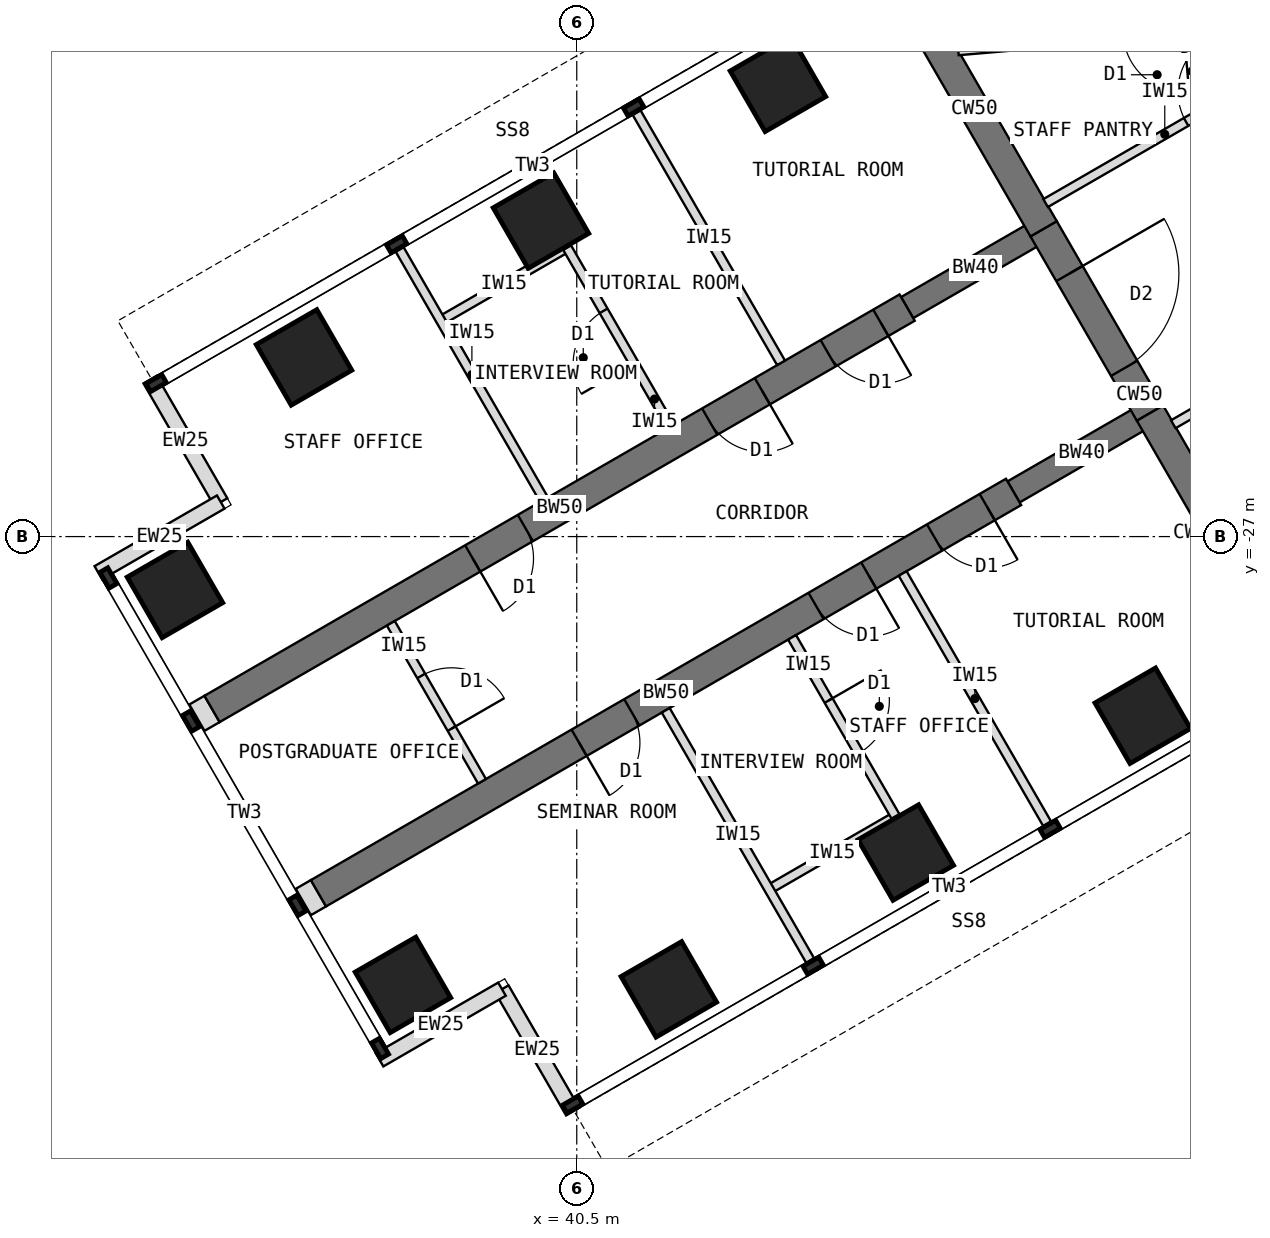
"""IFC4 building model, lengths in metres.
Left out: names, types, materials, properties, quantities, classifications, styles, units other than length and angle.
Written with IfcOpenShell. Run it as: python <this file> out.ifc"""

import sys

from ifc_helpers import new_model, si_unit, direction, frame, frame_2d, origin, origin_2d, place, context, subcontext, project, spatial, rectangle, extrude, element, fill, save


model = new_model("IFC4")
c1 = context("Model", 3, precision=1e-05, world=origin(), true_north=direction((0.0, 1.0)))
c2 = subcontext(c1, "Body", "Model", "MODEL_VIEW")
j1 = project(units=[si_unit("LENGTHUNIT", "METRE"), si_unit("PLANEANGLEUNIT", "RADIAN")], contexts=[c1])
p1 = place(None, origin())
s1 = spatial("IfcSite", under=j1, at=p1, CompositionType="ELEMENT")
p2 = place(p1, origin())
s2 = spatial("IfcBuilding", under=s1, at=p2, CompositionType="ELEMENT")
p3 = place(p2, frame((0.0, 0.0, 206.5)))
s3 = spatial("IfcBuildingStorey", under=s2, at=p3, CompositionType="ELEMENT", Elevation=206.5)
p4 = place(p3, frame((45.904, -18.0, 0.0), z_axis=(0.0, 0.0, 1.0), x_axis=(0.500024481964, -0.866011268655, 0.0)))
e1 = element("IfcWall", 1, at=p4, inside=s3, PredefinedType="SHEAR", context=c2, shape_type="SweptSolid", body=[
    extrude(rectangle(XDim=4.548, YDim=0.5, at=frame_2d((2.274, 0.0))), origin(), (0.0, 0.0, 1.0), 4.0),
])
p5 = place(p3, frame((48.178, -21.939, 0.0), z_axis=(0.0, 0.0, 1.0), x_axis=(0.500010275428, -0.866019471182, 0.0)))
e2 = element("IfcWall", 2, at=p5, inside=s3, PredefinedType="SHEAR", context=c2, shape_type="SweptSolid", body=[
    extrude(rectangle(XDim=3.5, YDim=0.5, at=frame_2d((1.75, 0.0))), origin(), (0.0, 0.0, 1.0), 4.0),
])
p6 = place(p5, frame((0.85, 0.0, 0.0)))
e3 = element("IfcOpeningElement", 3, at=p6, cuts=e2, PredefinedType="OPENING", context=c2, shape_type="SweptSolid", body=[
    extrude(rectangle(XDim=1.8, YDim=2.1, at=frame_2d((0.9, 1.05))), frame((0.0, 0.26, 0.0), z_axis=(0.0, -1.0, 0.0), x_axis=(1.0, 0.0, 0.0)), (0.0, 0.0, 1.0), 0.52),
])
p7 = place(p3, frame((49.928, -24.97, 0.0), z_axis=(0.0, 0.0, 1.0), x_axis=(0.499984222037, -0.866034513004, 0.0)))
e4 = element("IfcWall", 4, at=p7, inside=s3, PredefinedType="SHEAR", context=c2, shape_type="SweptSolid", body=[
    extrude(rectangle(XDim=4.548, YDim=0.5, at=frame_2d((2.274, 0.0))), origin(), (0.0, 0.0, 1.0), 4.0),
])
p8 = place(p3, frame((49.928, -24.97, 0.0), z_axis=(0.0, 0.0, 1.0), x_axis=(-0.866031863473, -0.499988811324, 0.0)))
e5 = element("IfcWall", 5, at=p8, inside=s3, PredefinedType="SHEAR", context=c2, shape_type="SweptSolid", body=[
    extrude(rectangle(XDim=2.592, YDim=0.4, at=frame_2d((1.296, 0.0))), origin(), (0.0, 0.0, 1.0), 4.0),
])
p9 = place(p3, frame((47.684, -26.266, 0.0), z_axis=(0.0, 0.0, 1.0), x_axis=(-0.866027579429, -0.499996231654, 0.0)))
e6 = element("IfcWall", 6, at=p9, inside=s3, PredefinedType="SHEAR", context=c2, shape_type="SweptSolid", body=[
    extrude(rectangle(XDim=13.2, YDim=0.5, at=frame_2d((6.6, 0.0))), origin(), (0.0, 0.0, 1.0), 4.0),
])
p10 = place(p9, frame((0.5, 0.0, 0.0)))
e7 = element("IfcOpeningElement", 7, at=p10, cuts=e6, PredefinedType="OPENING", context=c2, shape_type="SweptSolid", body=[
    extrude(rectangle(XDim=1.0, YDim=2.1, at=frame_2d((0.5, 1.05))), frame((0.0, 0.26, 0.0), z_axis=(0.0, -1.0, 0.0), x_axis=(1.0, 0.0, 0.0)), (0.0, 0.0, 1.0), 0.52),
])
p11 = place(p9, frame((2.75, 0.0, 0.0)))
e8 = element("IfcOpeningElement", 8, at=p11, cuts=e6, PredefinedType="OPENING", context=c2, shape_type="SweptSolid", body=[
    extrude(rectangle(XDim=1.0, YDim=2.1, at=frame_2d((0.5, 1.05))), frame((0.0, 0.26, 0.0), z_axis=(0.0, -1.0, 0.0), x_axis=(1.0, 0.0, 0.0)), (0.0, 0.0, 1.0), 0.52),
])
p12 = place(p9, frame((7.25, 0.0, 0.0)))
e9 = element("IfcOpeningElement", 9, at=p12, cuts=e6, PredefinedType="OPENING", context=c2, shape_type="SweptSolid", body=[
    extrude(rectangle(XDim=1.0, YDim=2.1, at=frame_2d((0.5, 1.05))), frame((0.0, 0.26, 0.0), z_axis=(0.0, -1.0, 0.0), x_axis=(1.0, 0.0, 0.0)), (0.0, 0.0, 1.0), 0.52),
])
p13 = place(p3, frame((48.178, -21.939, 0.0), z_axis=(0.0, 0.0, 1.0), x_axis=(-0.866072649678, -0.499918158782, 0.0)))
e10 = element("IfcWall", 10, at=p13, inside=s3, PredefinedType="SHEAR", context=c2, shape_type="SweptSolid", body=[
    extrude(rectangle(XDim=2.592, YDim=0.4, at=frame_2d((1.296, 0.0))), origin(), (0.0, 0.0, 1.0), 4.0),
])
p14 = place(p3, frame((45.934, -23.234, 0.0), z_axis=(0.0, 0.0, 1.0), x_axis=(-0.866019570528, -0.500010103361, 0.0)))
e11 = element("IfcWall", 11, at=p14, inside=s3, PredefinedType="SHEAR", context=c2, shape_type="SweptSolid", body=[
    extrude(rectangle(XDim=13.2, YDim=0.5, at=frame_2d((6.6, 0.0))), origin(), (0.0, 0.0, 1.0), 4.0),
])
p15 = place(p14, frame((0.5, 0.0, 0.0)))
e12 = element("IfcOpeningElement", 12, at=p15, cuts=e11, PredefinedType="OPENING", context=c2, shape_type="SweptSolid", body=[
    extrude(rectangle(XDim=1.0, YDim=2.1, at=frame_2d((0.5, 1.05))), frame((0.0, 0.26, 0.0), z_axis=(0.0, -1.0, 0.0), x_axis=(1.0, 0.0, 0.0)), (0.0, 0.0, 1.0), 0.52),
])
p16 = place(p14, frame((2.75, 0.0, 0.0)))
e13 = element("IfcOpeningElement", 13, at=p16, cuts=e11, PredefinedType="OPENING", context=c2, shape_type="SweptSolid", body=[
    extrude(rectangle(XDim=1.0, YDim=2.1, at=frame_2d((0.5, 1.05))), frame((0.0, 0.26, 0.0), z_axis=(0.0, -1.0, 0.0), x_axis=(1.0, 0.0, 0.0)), (0.0, 0.0, 1.0), 0.52),
])
p17 = place(p14, frame((7.25, 0.0, 0.0)))
e14 = element("IfcOpeningElement", 14, at=p17, cuts=e11, PredefinedType="OPENING", context=c2, shape_type="SweptSolid", body=[
    extrude(rectangle(XDim=1.0, YDim=2.1, at=frame_2d((0.5, 1.05))), frame((0.0, 0.26, 0.0), z_axis=(0.0, -1.0, 0.0), x_axis=(1.0, 0.0, 0.0)), (0.0, 0.0, 1.0), 0.52),
])
for number, where, z_axis, x_axis in (
    (15, (49.809, -29.946, 0.0), (0.0, 0.0, 1.0), (0.866, 0.5, 0.0)),
    (16, (43.809, -19.554, 0.0), (0.0, 0.0, 1.0), (0.866, 0.5, 0.0)),
    (17, (45.912, -32.196, 0.0), (0.0, 0.0, 1.0), (0.866, 0.5, 0.0)),
    (18, (39.912, -21.804, 0.0), (0.0, 0.0, 1.0), (0.866, 0.5, 0.0)),
    (19, (42.014, -34.446, 0.0), (0.0, 0.0, 1.0), (0.866, 0.5, 0.0)),
    (20, (36.014, -24.054, 0.0), (0.0, 0.0, 1.0), (0.866, 0.5, 0.0)),
    (21, (37.642, -34.373, 0.0), (0.0, 0.0, 1.0), (0.866, 0.5, 0.0)),
    (22, (33.892, -27.877, 0.0), (0.0, 0.0, 1.0), (0.866, 0.5, 0.0)),
):
    element("IfcColumn", number, at=place(p3, frame(where, z_axis=z_axis, x_axis=x_axis)), inside=s3, PredefinedType="COLUMN", context=c2, shape_type="SweptSolid", body=[
        extrude(rectangle(XDim=1.15, YDim=1.15, at=origin_2d()), origin(), (0.0, 0.0, 1.0), 4.0),
    ])
for number, where, z_axis, x_axis in (
    (23, (40.433, -36.456, 0.0), (0.0, 0.0, 1.0), (-0.5, 0.866, 0.0)),
    (24, (39.27, -34.443, 0.0), (0.0, 0.0, 1.0), (-0.866, -0.5, 0.0)),
    (25, (33.483, -24.419, 0.0), (0.0, 0.0, 1.0), (0.5, -0.866, 0.0)),
    (26, (34.645, -26.432, 0.0), (0.0, 0.0, 1.0), (-0.866, -0.5, 0.0)),
):
    element("IfcWall", number, at=place(p3, frame(where, z_axis=z_axis, x_axis=x_axis)), inside=s3, PredefinedType="STANDARD", context=c2, shape_type="SweptSolid", body=[
        extrude(rectangle(XDim=2.325, YDim=0.25, at=frame_2d((1.163, 0.0))), origin(), (0.0, 0.0, 1.0), 3.8),
    ])
for number, where, z_axis, x_axis in (
    (27, (36.252, -32.865, 0.0), (0.0, 0.0, 1.0), (-0.866, -0.5, 0.0)),
    (28, (34.502, -29.834, 0.0), (0.0, 0.0, 1.0), (-0.866, -0.5, 0.0)),
):
    element("IfcWall", number, at=place(p3, frame(where, z_axis=z_axis, x_axis=x_axis)), inside=s3, PredefinedType="PARTITIONING", context=c2, shape_type="SweptSolid", body=[
        extrude(rectangle(XDim=0.288, YDim=0.5, at=frame_2d((0.144, 0.0))), origin(), (0.0, 0.0, 1.0), 3.8),
    ])
p18 = place(p3, frame((52.38, -19.201, 0.0), z_axis=(0.0, 0.0, 1.0), x_axis=(-0.866012946976, 0.500021575205, 0.0)))
e29 = element("IfcWall", 29, at=p18, inside=s3, PredefinedType="SHEAR", context=c2, shape_type="SweptSolid", body=[
    extrude(rectangle(XDim=5.958, YDim=0.4, at=frame_2d((2.979, 0.0))), origin(), (0.0, 0.0, 1.0), 4.0),
])
for number, where, z_axis, x_axis in (
    (30, (45.86, -27.607, 0.0), (0.0, 0.0, 1.0), (0.5, -0.866, 0.0)),
    (31, (41.963, -29.857, 0.0), (0.0, 0.0, 1.0), (0.5, -0.866, 0.0)),
):
    element("IfcWall", number, at=place(p3, frame(where, z_axis=z_axis, x_axis=x_axis)), inside=s3, PredefinedType="PARTITIONING", context=c2, shape_type="SweptSolid", body=[
        extrude(rectangle(XDim=4.75, YDim=0.15, at=frame_2d((2.375, 0.0))), origin(), (0.0, 0.0, 1.0), 3.8),
    ])
p19 = place(p3, frame((45.741, -31.602, 0.0), z_axis=(0.0, 0.0, 1.0), x_axis=(-0.866024647952, -0.500001309137, 0.0)))
e32 = element("IfcWall", 32, at=p19, inside=s3, PredefinedType="PARTITIONING", context=c2, shape_type="SweptSolid", body=[
    extrude(rectangle(XDim=2.4, YDim=0.15, at=frame_2d((1.2, 0.0))), origin(), (0.0, 0.0, 1.0), 3.8),
])
p20 = place(p3, frame((44.042, -28.657, 0.0), z_axis=(0.0, 0.0, 1.0), x_axis=(0.499977295307, -0.866038511948, 0.0)))
e33 = element("IfcWall", 33, at=p20, inside=s3, PredefinedType="PARTITIONING", context=c2, shape_type="SweptSolid", body=[
    extrude(rectangle(XDim=3.4, YDim=0.15, at=frame_2d((1.7, 0.0))), origin(), (0.0, 0.0, 1.0), 3.8),
])
p21 = place(p20, frame((1.2, 0.0, 0.0)))
e34 = element("IfcOpeningElement", 34, at=p21, cuts=e33, PredefinedType="OPENING", context=c2, shape_type="SweptSolid", body=[
    extrude(rectangle(XDim=1.0, YDim=2.1, at=frame_2d((0.5, 1.05))), frame((0.0, 0.085, 0.0), z_axis=(0.0, -1.0, 0.0), x_axis=(1.0, 0.0, 0.0)), (0.0, 0.0, 1.0), 0.17),
])
for number, where, z_axis, x_axis in (
    (35, (43.86, -24.143, 0.0), (0.0, 0.0, 1.0), (-0.5, 0.866, 0.0)),
    (36, (39.963, -26.393, 0.0), (0.0, 0.0, 1.0), (-0.5, 0.866, 0.0)),
):
    element("IfcWall", number, at=place(p3, frame(where, z_axis=z_axis, x_axis=x_axis)), inside=s3, PredefinedType="PARTITIONING", context=c2, shape_type="SweptSolid", body=[
        extrude(rectangle(XDim=4.75, YDim=0.15, at=frame_2d((2.375, 0.0))), origin(), (0.0, 0.0, 1.0), 3.8),
    ])
p22 = place(p3, frame((40.342, -22.249, 0.0), z_axis=(0.0, 0.0, 1.0), x_axis=(-0.866050077142, -0.499957262057, 0.0)))
e37 = element("IfcWall", 37, at=p22, inside=s3, PredefinedType="PARTITIONING", context=c2, shape_type="SweptSolid", body=[
    extrude(rectangle(XDim=2.4, YDim=0.15, at=frame_2d((1.2, 0.0))), origin(), (0.0, 0.0, 1.0), 3.8),
])
p23 = place(p3, frame((42.042, -25.193, 0.0), z_axis=(0.0, 0.0, 1.0), x_axis=(-0.500008388397, 0.866020560687, 0.0)))
e38 = element("IfcWall", 38, at=p23, inside=s3, PredefinedType="PARTITIONING", context=c2, shape_type="SweptSolid", body=[
    extrude(rectangle(XDim=3.4, YDim=0.15, at=frame_2d((1.7, 0.0))), origin(), (0.0, 0.0, 1.0), 3.8),
])
p24 = place(p23, frame((1.2, 0.0, 0.0)))
e39 = element("IfcOpeningElement", 39, at=p24, cuts=e38, PredefinedType="OPENING", context=c2, shape_type="SweptSolid", body=[
    extrude(rectangle(XDim=1.0, YDim=2.1, at=frame_2d((0.5, 1.05))), frame((0.0, 0.085, 0.0), z_axis=(0.0, -1.0, 0.0), x_axis=(1.0, 0.0, 0.0)), (0.0, 0.0, 1.0), 0.17),
])
p25 = place(p3, frame((54.23, -22.89, 0.0), z_axis=(0.0, 0.0, 1.0), x_axis=(-0.866006805923, -0.500032211057, 0.0)))
e40 = element("IfcWall", 40, at=p25, inside=s3, PredefinedType="PARTITIONING", context=c2, shape_type="SweptSolid", body=[
    extrude(rectangle(XDim=4.526, YDim=0.15, at=frame_2d((2.263, 0.0))), origin(), (0.0, 0.0, 1.0), 3.8),
])
p26 = place(p25, frame((0.858, 0.0, 0.0)))
e41 = element("IfcOpeningElement", 41, at=p26, cuts=e40, PredefinedType="OPENING", context=c2, shape_type="SweptSolid", body=[
    extrude(rectangle(XDim=1.0, YDim=2.1, at=frame_2d((0.5, 1.05))), frame((0.0, 0.085, 0.0), z_axis=(0.0, -1.0, 0.0), x_axis=(1.0, 0.0, 0.0)), (0.0, 0.0, 1.0), 0.17),
])
p27 = place(p3, frame((48.211, -21.515, 0.0), z_axis=(0.0, 0.0, 1.0), x_axis=(0.866043651885, 0.499968392031, 0.0)))
e42 = element("IfcWall", 42, at=p27, inside=s3, PredefinedType="PARTITIONING", context=c2, shape_type="SweptSolid", body=[
    extrude(rectangle(XDim=4.526, YDim=0.15, at=frame_2d((2.263, 0.0))), origin(), (0.0, 0.0, 1.0), 3.8),
])
p28 = place(p27, frame((2.668, 0.0, 0.0)))
e43 = element("IfcOpeningElement", 43, at=p28, cuts=e42, PredefinedType="OPENING", context=c2, shape_type="SweptSolid", body=[
    extrude(rectangle(XDim=1.0, YDim=2.1, at=frame_2d((0.5, 1.05))), frame((0.0, 0.085, 0.0), z_axis=(0.0, -1.0, 0.0), x_axis=(1.0, 0.0, 0.0)), (0.0, 0.0, 1.0), 0.17),
])
p29 = place(p3, frame((51.364, -18.614, 0.0), z_axis=(0.0, 0.0, 1.0), x_axis=(-0.996314617181, -0.085774026317, 0.0)))
e44 = element("IfcWall", 44, at=p29, inside=s3, PredefinedType="PARTITIONING", context=c2, shape_type="SweptSolid", body=[
    extrude(rectangle(XDim=4.605, YDim=0.15, at=frame_2d((2.303, 0.0))), origin(), (0.0, 0.0, 1.0), 3.8),
])
p30 = place(p29, frame((0.882, 0.0, 0.0)))
e45 = element("IfcOpeningElement", 45, at=p30, cuts=e44, PredefinedType="OPENING", context=c2, shape_type="SweptSolid", body=[
    extrude(rectangle(XDim=1.0, YDim=2.1, at=frame_2d((0.5, 1.05))), frame((0.0, 0.085, 0.0), z_axis=(0.0, -1.0, 0.0), x_axis=(1.0, 0.0, 0.0)), (0.0, 0.0, 1.0), 0.17),
])
p31 = place(p3, frame((37.442, -28.426, 0.0), z_axis=(0.0, 0.0, 1.0), x_axis=(0.50002537861, -0.866010750942, 0.0)))
e46 = element("IfcWall", 46, at=p31, inside=s3, PredefinedType="PARTITIONING", context=c2, shape_type="SweptSolid", body=[
    extrude(rectangle(XDim=3.0, YDim=0.15, at=frame_2d((1.5, 0.0))), origin(), (0.0, 0.0, 1.0), 3.8),
])
p32 = place(p31, frame((1.0, 0.0, 0.0)))
e47 = element("IfcOpeningElement", 47, at=p32, cuts=e46, PredefinedType="OPENING", context=c2, shape_type="SweptSolid", body=[
    extrude(rectangle(XDim=1.0, YDim=2.1, at=frame_2d((0.5, 1.05))), frame((0.0, 0.085, 0.0), z_axis=(0.0, -1.0, 0.0), x_axis=(1.0, 0.0, 0.0)), (0.0, 0.0, 1.0), 0.17),
])
p33 = place(p6, origin())
e48 = element("IfcDoor", 48, at=p33, inside=s3, OperationType="DOUBLE_DOOR_DOUBLE_SWING", PredefinedType="DOOR", context=c2, shape_type="SweptSolid", body=[
    extrude(rectangle(XDim=1.8, YDim=2.1, at=frame_2d((0.9, 1.05))), frame((0.0, 0.025, 0.0), z_axis=(0.0, -1.0, 0.0), x_axis=(1.0, 0.0, 0.0)), (0.0, 0.0, 1.0), 0.05),
])
fill(e3, e48)
p34 = place(p21, origin())
e49 = element("IfcDoor", 49, at=p34, inside=s3, OperationType="SINGLE_SWING_LEFT", PredefinedType="DOOR", context=c2, shape_type="SweptSolid", body=[
    extrude(rectangle(XDim=1.0, YDim=2.1, at=frame_2d((0.5, 1.05))), frame((0.0, 0.025, 0.0), z_axis=(0.0, -1.0, 0.0), x_axis=(1.0, 0.0, 0.0)), (0.0, 0.0, 1.0), 0.05),
])
fill(e34, e49)
p35 = place(p24, origin())
e50 = element("IfcDoor", 50, at=p35, inside=s3, OperationType="SINGLE_SWING_LEFT", PredefinedType="DOOR", context=c2, shape_type="SweptSolid", body=[
    extrude(rectangle(XDim=1.0, YDim=2.1, at=frame_2d((0.5, 1.05))), frame((0.0, 0.025, 0.0), z_axis=(0.0, -1.0, 0.0), x_axis=(1.0, 0.0, 0.0)), (0.0, 0.0, 1.0), 0.05),
])
fill(e39, e50)
p36 = place(p28, origin())
e51 = element("IfcDoor", 51, at=p36, inside=s3, OperationType="SINGLE_SWING_RIGHT", PredefinedType="DOOR", context=c2, shape_type="SweptSolid", body=[
    extrude(rectangle(XDim=1.0, YDim=2.1, at=frame_2d((0.5, 1.05))), frame((0.0, 0.025, 0.0), z_axis=(0.0, -1.0, 0.0), x_axis=(1.0, 0.0, 0.0)), (0.0, 0.0, 1.0), 0.05),
])
fill(e43, e51)
p37 = place(p32, origin())
e52 = element("IfcDoor", 52, at=p37, inside=s3, OperationType="SINGLE_SWING_RIGHT", PredefinedType="DOOR", context=c2, shape_type="SweptSolid", body=[
    extrude(rectangle(XDim=1.0, YDim=2.1, at=frame_2d((0.5, 1.05))), frame((0.0, 0.025, 0.0), z_axis=(0.0, -1.0, 0.0), x_axis=(1.0, 0.0, 0.0)), (0.0, 0.0, 1.0), 0.05),
])
fill(e47, e52)
p38 = place(p10, origin())
e53 = element("IfcDoor", 53, at=p38, inside=s3, OperationType="SINGLE_SWING_LEFT", PredefinedType="DOOR", context=c2, shape_type="SweptSolid", body=[
    extrude(rectangle(XDim=1.0, YDim=2.1, at=frame_2d((0.5, 1.05))), frame((0.0, 0.025, 0.0), z_axis=(0.0, -1.0, 0.0), x_axis=(1.0, 0.0, 0.0)), (0.0, 0.0, 1.0), 0.05),
])
fill(e7, e53)
p39 = place(p11, origin())
e54 = element("IfcDoor", 54, at=p39, inside=s3, OperationType="SINGLE_SWING_LEFT", PredefinedType="DOOR", context=c2, shape_type="SweptSolid", body=[
    extrude(rectangle(XDim=1.0, YDim=2.1, at=frame_2d((0.5, 1.05))), frame((0.0, 0.025, 0.0), z_axis=(0.0, -1.0, 0.0), x_axis=(1.0, 0.0, 0.0)), (0.0, 0.0, 1.0), 0.05),
])
fill(e8, e54)
p40 = place(p12, origin())
e55 = element("IfcDoor", 55, at=p40, inside=s3, OperationType="SINGLE_SWING_RIGHT", PredefinedType="DOOR", context=c2, shape_type="SweptSolid", body=[
    extrude(rectangle(XDim=1.0, YDim=2.1, at=frame_2d((0.5, 1.05))), frame((0.0, 0.025, 0.0), z_axis=(0.0, -1.0, 0.0), x_axis=(1.0, 0.0, 0.0)), (0.0, 0.0, 1.0), 0.05),
])
fill(e9, e55)
p41 = place(p15, origin())
e56 = element("IfcDoor", 56, at=p41, inside=s3, OperationType="SINGLE_SWING_LEFT", PredefinedType="DOOR", context=c2, shape_type="SweptSolid", body=[
    extrude(rectangle(XDim=1.0, YDim=2.1, at=frame_2d((0.5, 1.05))), frame((0.0, 0.025, 0.0), z_axis=(0.0, -1.0, 0.0), x_axis=(1.0, 0.0, 0.0)), (0.0, 0.0, 1.0), 0.05),
])
fill(e12, e56)
p42 = place(p16, origin())
e57 = element("IfcDoor", 57, at=p42, inside=s3, OperationType="SINGLE_SWING_LEFT", PredefinedType="DOOR", context=c2, shape_type="SweptSolid", body=[
    extrude(rectangle(XDim=1.0, YDim=2.1, at=frame_2d((0.5, 1.05))), frame((0.0, 0.025, 0.0), z_axis=(0.0, -1.0, 0.0), x_axis=(1.0, 0.0, 0.0)), (0.0, 0.0, 1.0), 0.05),
])
fill(e13, e57)
p43 = place(p17, origin())
e58 = element("IfcDoor", 58, at=p43, inside=s3, OperationType="SINGLE_SWING_RIGHT", PredefinedType="DOOR", context=c2, shape_type="SweptSolid", body=[
    extrude(rectangle(XDim=1.0, YDim=2.1, at=frame_2d((0.5, 1.05))), frame((0.0, 0.025, 0.0), z_axis=(0.0, -1.0, 0.0), x_axis=(1.0, 0.0, 0.0)), (0.0, 0.0, 1.0), 0.05),
])
fill(e14, e58)
save(model, sys.argv[1])
